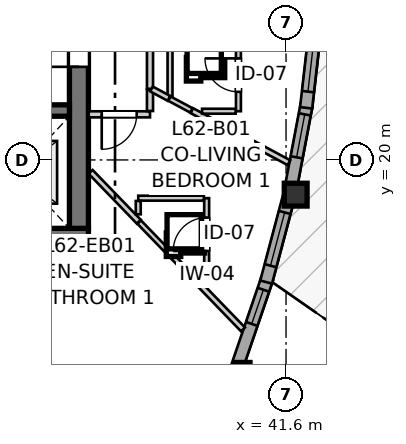
"""IFC4 building model, lengths in metres.
Left out: names, types, materials, properties, quantities, classifications, styles, units other than length and angle.
Written with IfcOpenShell. Run it as: python <this file> out.ifc"""

import sys

from ifc_helpers import new_model, si_unit, direction, frame, frame_2d, origin, origin_2d, place, context, subcontext, project, spatial, rectangle, i_section, extrude, source, transform, mapped, element, fill, save


model = new_model("IFC4")
c1 = context("Model", 3, precision=1e-05, world=origin(), true_north=direction((0.0, 1.0)))
c2 = subcontext(c1, "Body", "Model", "MODEL_VIEW")
j1 = project(units=[si_unit("LENGTHUNIT", "METRE"), si_unit("PLANEANGLEUNIT", "RADIAN")], contexts=[c1])
p1 = place(None, origin())
s1 = spatial("IfcSite", under=j1, at=p1, CompositionType="ELEMENT")
p2 = place(p1, origin())
s2 = spatial("IfcBuilding", under=s1, at=p2, CompositionType="ELEMENT")
p3 = place(p2, frame((0.0, 0.0, 208.4)))
s3 = spatial("IfcBuildingStorey", under=s2, at=p3, CompositionType="ELEMENT", Elevation=208.4)
p4 = place(p3, frame((24.3, 17.95, 0.0), z_axis=(0.0, 0.0, 1.0), x_axis=(1.0, 0.0, 0.0)))
e1 = element("IfcWall", 1, at=p4, inside=s3, PredefinedType="SHEAR", context=c2, shape_type="SweptSolid", body=[
    extrude(rectangle(XDim=12.1, YDim=0.5, at=frame_2d((6.05, 0.0))), origin(), (0.0, 0.0, 1.0), 2.935),
])
p5 = place(p3, frame((36.15, 18.2, 0.0), z_axis=(0.0, 0.0, 1.0), x_axis=(0.0, 1.0, 0.0)))
e2 = element("IfcWall", 2, at=p5, inside=s3, PredefinedType="SHEAR", context=c2, shape_type="SweptSolid", body=[
    extrude(rectangle(XDim=15.6, YDim=0.5, at=frame_2d((7.8, 0.0))), origin(), (0.0, 0.0, 1.0), 2.935),
])
p6 = place(p5, frame((4.25, 0.0, 0.0)))
e3 = element("IfcOpeningElement", 3, at=p6, cuts=e2, PredefinedType="OPENING", context=c2, shape_type="SweptSolid", body=[
    extrude(rectangle(XDim=1.1, YDim=2.15, at=frame_2d((0.55, 1.075))), frame((0.0, 0.26, 0.0), z_axis=(0.0, -1.0, 0.0), x_axis=(1.0, 0.0, 0.0)), (0.0, 0.0, 1.0), 0.52),
])
p7 = place(p5, frame((10.25, 0.0, 0.0)))
e4 = element("IfcOpeningElement", 4, at=p7, cuts=e2, PredefinedType="OPENING", context=c2, shape_type="SweptSolid", body=[
    extrude(rectangle(XDim=1.1, YDim=2.15, at=frame_2d((0.55, 1.075))), frame((0.0, 0.26, 0.0), z_axis=(0.0, -1.0, 0.0), x_axis=(1.0, 0.0, 0.0)), (0.0, 0.0, 1.0), 0.52),
])
p8 = place(p3, frame((24.8, 21.3, 0.0), z_axis=(0.0, 0.0, 1.0), x_axis=(1.0, 0.0, 0.0)))
e5 = element("IfcWall", 5, at=p8, inside=s3, PredefinedType="SHEAR", context=c2, shape_type="SweptSolid", body=[
    extrude(rectangle(XDim=11.1, YDim=0.3, at=frame_2d((5.55, 0.0))), origin(), (0.0, 0.0, 1.0), 2.935),
])
p9 = place(p8, frame((6.22, 0.0, 0.0)))
e6 = element("IfcOpeningElement", 6, at=p9, cuts=e5, PredefinedType="OPENING", context=c2, shape_type="SweptSolid", body=[
    extrude(rectangle(XDim=0.98, YDim=2.15, at=frame_2d((0.49, 1.075))), frame((0.0, 0.16, 0.0), z_axis=(0.0, -1.0, 0.0), x_axis=(1.0, 0.0, 0.0)), (0.0, 0.0, 1.0), 0.32),
])
p10 = place(p8, frame((9.15, 0.0, 0.0)))
e7 = element("IfcOpeningElement", 7, at=p10, cuts=e5, PredefinedType="OPENING", context=c2, shape_type="SweptSolid", body=[
    extrude(rectangle(XDim=1.15, YDim=2.15, at=frame_2d((0.575, 1.075))), frame((0.0, 0.16, 0.0), z_axis=(0.0, -1.0, 0.0), x_axis=(1.0, 0.0, 0.0)), (0.0, 0.0, 1.0), 0.32),
])
m1 = source(origin(), c2, "Body", "SweptSolid", [
    extrude(i_section(OverallWidth=0.398, OverallDepth=0.387, WebThickness=0.019, FlangeThickness=0.03, FilletRadius=0.015, at=origin_2d()), origin(), (0.0, 0.0, 1.0), 2.935),
])
p11 = place(p3, frame((40.452, 14.478, 0.0), z_axis=(0.0, 0.0, 1.0), x_axis=(1.0, 0.0, 0.0)))
e8 = element("IfcColumn", 8, at=p11, inside=s3, PredefinedType="PILASTER", context=c2, shape_type="MappedRepresentation", body=[
    mapped(m1, transform((0.0, 0.0, 0.0), x_axis=(1.0, 0.0, 0.0), y_axis=(0.0, 1.0, 0.0), z_axis=(0.0, 0.0, 1.0), scale=1.0)),
])
m2 = source(origin(), c2, "Body", "SweptSolid", [
    extrude(rectangle(XDim=0.6, YDim=0.6, at=origin_2d()), origin(), (0.0, 0.0, 1.0), 2.935),
])
p12 = place(p3, frame((41.854, 19.086, 0.0), z_axis=(0.0, 0.0, 1.0), x_axis=(1.0, 0.0, 0.0)))
e9 = element("IfcColumn", 9, at=p12, inside=s3, PredefinedType="COLUMN", context=c2, shape_type="MappedRepresentation", body=[
    mapped(m2, transform((0.0, 0.0, 0.0), x_axis=(1.0, 0.0, 0.0), y_axis=(0.0, 1.0, 0.0), z_axis=(0.0, 0.0, 1.0), scale=1.0)),
])
p13 = place(p3, frame((40.308, 14.548, 0.0), z_axis=(0.0, 0.0, 1.0), x_axis=(0.323591564922, 0.946196860654, 0.0)))
e10 = element("IfcWall", 10, at=p13, inside=s3, PredefinedType="SOLIDWALL", context=c2, shape_type="SweptSolid", body=[
    extrude(rectangle(XDim=2.454, YDim=0.32, at=frame_2d((1.227, 0.0))), origin(), (0.0, 0.0, 1.0), 2.555),
])
p14 = place(p13, frame((1.202, 0.0, 0.82)))
e11 = element("IfcOpeningElement", 11, at=p14, cuts=e10, PredefinedType="OPENING", context=c2, shape_type="SweptSolid", body=[
    extrude(rectangle(XDim=0.95, YDim=1.35, at=frame_2d((0.475, 0.675))), frame((0.0, 0.17, 0.0), z_axis=(0.0, -1.0, 0.0), x_axis=(1.0, 0.0, 0.0)), (0.0, 0.0, 1.0), 0.34),
])
p15 = place(p3, frame((41.076, 16.786, 0.0), z_axis=(0.0, 0.0, 1.0), x_axis=(0.257037260973, 0.966401493413, 0.0)))
e12 = element("IfcWall", 12, at=p15, inside=s3, PredefinedType="SOLIDWALL", context=c2, shape_type="SweptSolid", body=[
    extrude(rectangle(XDim=2.333, YDim=0.32, at=frame_2d((1.167, 0.0))), origin(), (0.0, 0.0, 1.0), 2.555),
])
p16 = place(p15, frame((0.446, 0.0, 0.82)))
e13 = element("IfcOpeningElement", 13, at=p16, cuts=e12, PredefinedType="OPENING", context=c2, shape_type="SweptSolid", body=[
    extrude(rectangle(XDim=1.45, YDim=1.25, at=frame_2d((0.725, 0.625))), frame((0.0, 0.17, 0.0), z_axis=(0.0, -1.0, 0.0), x_axis=(1.0, 0.0, 0.0)), (0.0, 0.0, 1.0), 0.34),
])
p17 = place(p3, frame((41.713, 19.205, 0.0), z_axis=(0.0, 0.0, 1.0), x_axis=(0.186691464441, 0.982418595663, 0.0)))
e14 = element("IfcWall", 14, at=p17, inside=s3, PredefinedType="SOLIDWALL", context=c2, shape_type="SweptSolid", body=[
    extrude(rectangle(XDim=2.294, YDim=0.32, at=frame_2d((1.147, 0.0))), origin(), (0.0, 0.0, 1.0), 2.555),
])
p18 = place(p17, frame((0.88, 0.0, 0.82)))
e15 = element("IfcOpeningElement", 15, at=p18, cuts=e14, PredefinedType="OPENING", context=c2, shape_type="SweptSolid", body=[
    extrude(rectangle(XDim=1.15, YDim=1.2, at=frame_2d((0.575, 0.6))), frame((0.0, 0.17, 0.0), z_axis=(0.0, -1.0, 0.0), x_axis=(1.0, 0.0, 0.0)), (0.0, 0.0, 1.0), 0.34),
])
p19 = place(p3, frame((42.128, 21.371, 0.0), z_axis=(0.0, 0.0, 1.0), x_axis=(0.113319777802, 0.993558567956, 0.0)))
e16 = element("IfcWall", 16, at=p19, inside=s3, PredefinedType="SOLIDWALL", context=c2, shape_type="SweptSolid", body=[
    extrude(rectangle(XDim=2.338, YDim=0.32, at=frame_2d((1.169, 0.0))), origin(), (0.0, 0.0, 1.0), 2.555),
])
p20 = place(p19, frame((0.429, 0.0, 0.82)))
e17 = element("IfcOpeningElement", 17, at=p20, cuts=e16, PredefinedType="OPENING", context=c2, shape_type="SweptSolid", body=[
    extrude(rectangle(XDim=1.5, YDim=1.45, at=frame_2d((0.75, 0.725))), frame((0.0, 0.17, 0.0), z_axis=(0.0, -1.0, 0.0), x_axis=(1.0, 0.0, 0.0)), (0.0, 0.0, 1.0), 0.34),
])
p21 = place(p3, frame((38.02, 25.733, 0.0), z_axis=(0.0, 0.0, 1.0), x_axis=(0.0, -1.0, 0.0)))
e18 = element("IfcWall", 18, at=p21, inside=s3, PredefinedType="PARTITIONING", context=c2, shape_type="SweptSolid", body=[
    extrude(rectangle(XDim=3.862, YDim=0.16, at=frame_2d((1.931, 0.0))), origin(), (0.0, 0.0, 1.0), 2.935),
])
p22 = place(p21, frame((1.47, 0.0, 0.0)))
e19 = element("IfcOpeningElement", 19, at=p22, cuts=e18, PredefinedType="OPENING", context=c2, shape_type="SweptSolid", body=[
    extrude(rectangle(XDim=0.92, YDim=2.1, at=frame_2d((0.46, 1.05))), frame((0.0, 0.09, 0.0), z_axis=(0.0, -1.0, 0.0), x_axis=(1.0, 0.0, 0.0)), (0.0, 0.0, 1.0), 0.18),
])
p23 = place(p3, frame((39.511, 17.094, 0.0), z_axis=(0.0, 0.0, 1.0), x_axis=(0.0, 1.0, 0.0)))
e20 = element("IfcWall", 20, at=p23, inside=s3, PredefinedType="PARTITIONING", context=c2, shape_type="SweptSolid", body=[
    extrude(rectangle(XDim=1.9, YDim=0.13, at=frame_2d((0.95, 0.0))), origin(), (0.0, 0.0, 1.0), 2.935),
])
p24 = place(p23, frame((0.51, 0.0, 0.0)))
e21 = element("IfcOpeningElement", 21, at=p24, cuts=e20, PredefinedType="OPENING", context=c2, shape_type="SweptSolid", body=[
    extrude(rectangle(XDim=0.88, YDim=2.05, at=frame_2d((0.44, 1.025))), frame((0.0, 0.075, 0.0), z_axis=(0.0, -1.0, 0.0), x_axis=(1.0, 0.0, 0.0)), (0.0, 0.0, 1.0), 0.15),
])
p25 = place(p3, frame((40.347, 21.282, 0.0), z_axis=(0.0, 0.0, 1.0), x_axis=(0.0, 1.0, 0.0)))
e22 = element("IfcWall", 22, at=p25, inside=s3, PredefinedType="PARTITIONING", context=c2, shape_type="SweptSolid", body=[
    extrude(rectangle(XDim=1.9, YDim=0.13, at=frame_2d((0.95, 0.0))), origin(), (0.0, 0.0, 1.0), 2.573),
])
p26 = place(p25, frame((0.51, 0.0, 0.0)))
e23 = element("IfcOpeningElement", 23, at=p26, cuts=e22, PredefinedType="OPENING", context=c2, shape_type="SweptSolid", body=[
    extrude(rectangle(XDim=0.88, YDim=2.05, at=frame_2d((0.44, 1.025))), frame((0.0, 0.075, 0.0), z_axis=(0.0, -1.0, 0.0), x_axis=(1.0, 0.0, 0.0)), (0.0, 0.0, 1.0), 0.15),
])
p27 = place(p3, frame((38.02, 21.2, 0.0), z_axis=(0.0, 0.0, 1.0), x_axis=(-1.0, 0.0, 0.0)))
e24 = element("IfcWall", 24, at=p27, inside=s3, PredefinedType="PARTITIONING", context=c2, shape_type="SweptSolid", body=[
    extrude(rectangle(XDim=1.612, YDim=0.16, at=frame_2d((0.806, 0.0))), origin(), (0.0, 0.0, 1.0), 2.935),
])
p28 = place(p27, frame((0.35, 0.0, 0.0)))
e25 = element("IfcOpeningElement", 25, at=p28, cuts=e24, PredefinedType="OPENING", context=c2, shape_type="SweptSolid", body=[
    extrude(rectangle(XDim=0.92, YDim=2.1, at=frame_2d((0.46, 1.05))), frame((0.0, 0.09, 0.0), z_axis=(0.0, -1.0, 0.0), x_axis=(1.0, 0.0, 0.0)), (0.0, 0.0, 1.0), 0.18),
])
p29 = place(p3, frame((39.122, 21.297, 0.0), z_axis=(0.0, 0.0, 1.0), x_axis=(0.881308328415, -0.472541670402, 0.0)))
e26 = element("IfcWall", 26, at=p29, inside=s3, PredefinedType="PARTITIONING", context=c2, shape_type="SweptSolid", body=[
    extrude(rectangle(XDim=2.898, YDim=0.145, at=frame_2d((1.449, 0.0))), origin(), (0.0, 0.0, 1.0), 2.935),
])
p30 = place(p3, frame((38.951, 17.109, 0.0), z_axis=(0.0, 0.0, 1.0), x_axis=(0.695195716836, -0.718820502833, 0.0)))
e27 = element("IfcWall", 27, at=p30, inside=s3, PredefinedType="PARTITIONING", context=c2, shape_type="SweptSolid", body=[
    extrude(rectangle(XDim=2.18, YDim=0.145, at=frame_2d((1.09, 0.0))), origin(), (0.0, 0.0, 1.0), 2.935),
])
p31 = place(p3, frame((36.458, 19.686, 0.0), z_axis=(0.0, 0.0, 1.0), x_axis=(0.695231916786, -0.718785490868, 0.0)))
e28 = element("IfcWall", 28, at=p31, inside=s3, PredefinedType="PARTITIONING", context=c2, shape_type="SweptSolid", body=[
    extrude(rectangle(XDim=1.824, YDim=0.145, at=frame_2d((0.912, 0.0))), origin(), (0.0, 0.0, 1.0), 2.935),
])
p32 = place(p3, frame((37.711, 18.994, 0.0), z_axis=(0.0, 0.0, 1.0), x_axis=(1.0, 0.0, 0.0)))
e29 = element("IfcWall", 29, at=p32, inside=s3, PredefinedType="PARTITIONING", context=c2, shape_type="SweptSolid", body=[
    extrude(rectangle(XDim=1.727, YDim=0.13, at=frame_2d((0.864, 0.0))), origin(), (0.0, 0.0, 1.0), 2.935),
])
p33 = place(p3, frame((37.736, 18.364, 0.0), z_axis=(0.0, 0.0, 1.0), x_axis=(0.695451956037, -0.718572596781, 0.0)))
e30 = element("IfcWall", 30, at=p33, inside=s3, PredefinedType="PARTITIONING", context=c2, shape_type="SweptSolid", body=[
    extrude(rectangle(XDim=1.732, YDim=0.13, at=frame_2d((0.866, 0.0))), origin(), (0.0, 0.0, 1.0), 2.935),
])
p34 = place(p3, frame((38.547, 21.605, 0.0), z_axis=(0.0, 0.0, 1.0), x_axis=(0.0, 1.0, 0.0)))
e31 = element("IfcWall", 31, at=p34, inside=s3, PredefinedType="PARTITIONING", context=c2, shape_type="SweptSolid", body=[
    extrude(rectangle(XDim=1.504, YDim=0.13, at=frame_2d((0.752, 0.0))), origin(), (0.0, 0.0, 1.0), 2.603),
])
p35 = place(p3, frame((39.39, 21.282, 0.0), z_axis=(0.0, 0.0, 1.0), x_axis=(1.0, 0.0, 0.0)))
e32 = element("IfcWall", 32, at=p35, inside=s3, PredefinedType="PARTITIONING", context=c2, shape_type="SweptSolid", body=[
    extrude(rectangle(XDim=0.884, YDim=0.13, at=frame_2d((0.442, 0.0))), origin(), (0.0, 0.0, 1.0), 2.935),
])
p36 = place(p3, frame((38.02, 21.288, 0.0), z_axis=(0.0, 0.0, 1.0), x_axis=(0.0, 1.0, 0.0)))
e33 = element("IfcWall", 33, at=p36, inside=s3, PredefinedType="PARTITIONING", context=c2, shape_type="SweptSolid", body=[
    extrude(rectangle(XDim=0.568, YDim=0.16, at=frame_2d((0.284, 0.0))), origin(), (0.0, 0.0, 1.0), 2.935),
])
p37 = place(p3, frame((38.532, 21.613, 0.0), z_axis=(0.0, 0.0, 1.0), x_axis=(0.881618593919, -0.471962556626, 0.0)))
e34 = element("IfcWall", 34, at=p37, inside=s3, PredefinedType="PARTITIONING", context=c2, shape_type="SweptSolid", body=[
    extrude(rectangle(XDim=0.654, YDim=0.13, at=frame_2d((0.327, 0.0))), origin(), (0.0, 0.0, 1.0), 2.935),
])
p38 = place(p3, frame((37.711, 18.571, 0.0), z_axis=(0.0, 0.0, 1.0), x_axis=(0.0, 1.0, 0.0)))
e35 = element("IfcWall", 35, at=p38, inside=s3, PredefinedType="PARTITIONING", context=c2, shape_type="SweptSolid", body=[
    extrude(rectangle(XDim=0.35, YDim=0.13, at=frame_2d((0.175, 0.0))), origin(), (0.0, 0.0, 1.0), 2.935),
])
p39 = place(p3, frame((38.06, 21.867, 0.0), z_axis=(0.0, 0.0, 1.0), x_axis=(0.881026965879, -0.473066047601, 0.0)))
e36 = element("IfcWall", 36, at=p39, inside=s3, PredefinedType="PARTITIONING", context=c2, shape_type="SweptSolid", body=[
    extrude(rectangle(XDim=0.521, YDim=0.145, at=frame_2d((0.261, 0.0))), origin(), (0.0, 0.0, 1.0), 2.935),
])
p40 = place(p3, frame((39.056, 17.094, 0.0), z_axis=(0.0, 0.0, 1.0), x_axis=(1.0, 0.0, 0.0)))
e37 = element("IfcWall", 37, at=p40, inside=s3, PredefinedType="PARTITIONING", context=c2, shape_type="SweptSolid", body=[
    extrude(rectangle(XDim=0.455, YDim=0.13, at=frame_2d((0.228, 0.0))), origin(), (0.0, 0.0, 1.0), 2.935),
])
m3 = source(origin(), c2, "Body", "SweptSolid", [
    extrude(rectangle(XDim=0.95, YDim=1.35, at=frame_2d((0.475, 0.675))), frame((0.0, 0.03, 0.0), z_axis=(0.0, -1.0, 0.0), x_axis=(1.0, 0.0, 0.0)), (0.0, 0.0, 1.0), 0.06),
])
p41 = place(p14, origin())
e38 = element("IfcWindow", 38, at=p41, inside=s3, PartitioningType="SINGLE_PANEL", PredefinedType="WINDOW", context=c2, shape_type="MappedRepresentation", body=[
    mapped(m3, transform((0.0, 0.0, 0.0), x_axis=(1.0, 0.0, 0.0), y_axis=(0.0, 1.0, 0.0), z_axis=(0.0, 0.0, 1.0), scale=1.0)),
])
fill(e11, e38)
m4 = source(origin(), c2, "Body", "SweptSolid", [
    extrude(rectangle(XDim=1.45, YDim=1.25, at=frame_2d((0.725, 0.625))), frame((0.0, 0.03, 0.0), z_axis=(0.0, -1.0, 0.0), x_axis=(1.0, 0.0, 0.0)), (0.0, 0.0, 1.0), 0.06),
])
p42 = place(p16, origin())
e39 = element("IfcWindow", 39, at=p42, inside=s3, PartitioningType="SINGLE_PANEL", PredefinedType="WINDOW", context=c2, shape_type="MappedRepresentation", body=[
    mapped(m4, transform((0.0, 0.0, 0.0), x_axis=(1.0, 0.0, 0.0), y_axis=(0.0, 1.0, 0.0), z_axis=(0.0, 0.0, 1.0), scale=1.0)),
])
fill(e13, e39)
m5 = source(origin(), c2, "Body", "SweptSolid", [
    extrude(rectangle(XDim=1.15, YDim=1.2, at=frame_2d((0.575, 0.6))), frame((0.0, 0.03, 0.0), z_axis=(0.0, -1.0, 0.0), x_axis=(1.0, 0.0, 0.0)), (0.0, 0.0, 1.0), 0.06),
])
p43 = place(p18, origin())
e40 = element("IfcWindow", 40, at=p43, inside=s3, PartitioningType="SINGLE_PANEL", PredefinedType="WINDOW", context=c2, shape_type="MappedRepresentation", body=[
    mapped(m5, transform((0.0, 0.0, 0.0), x_axis=(1.0, 0.0, 0.0), y_axis=(0.0, 1.0, 0.0), z_axis=(0.0, 0.0, 1.0), scale=1.0)),
])
fill(e15, e40)
m6 = source(origin(), c2, "Body", "SweptSolid", [
    extrude(rectangle(XDim=1.5, YDim=1.45, at=frame_2d((0.75, 0.725))), frame((0.0, 0.03, 0.0), z_axis=(0.0, -1.0, 0.0), x_axis=(1.0, 0.0, 0.0)), (0.0, 0.0, 1.0), 0.06),
])
p44 = place(p20, origin())
e41 = element("IfcWindow", 41, at=p44, inside=s3, PartitioningType="SINGLE_PANEL", PredefinedType="WINDOW", context=c2, shape_type="MappedRepresentation", body=[
    mapped(m6, transform((0.0, 0.0, 0.0), x_axis=(1.0, 0.0, 0.0), y_axis=(0.0, 1.0, 0.0), z_axis=(0.0, 0.0, 1.0), scale=1.0)),
])
fill(e17, e41)
m7 = source(origin(), c2, "Body", "SweptSolid", [
    extrude(rectangle(XDim=1.1, YDim=2.15, at=frame_2d((0.55, 1.075))), frame((0.0, 0.025, 0.0), z_axis=(0.0, -1.0, 0.0), x_axis=(1.0, 0.0, 0.0)), (0.0, 0.0, 1.0), 0.05),
])
p45 = place(p6, origin())
e42 = element("IfcDoor", 42, at=p45, inside=s3, OperationType="SINGLE_SWING_LEFT", PredefinedType="DOOR", context=c2, shape_type="MappedRepresentation", body=[
    mapped(m7, transform((0.0, 0.0, 0.0), x_axis=(1.0, 0.0, 0.0), y_axis=(0.0, 1.0, 0.0), z_axis=(0.0, 0.0, 1.0), scale=1.0)),
])
fill(e3, e42)
m8 = source(origin(), c2, "Body", "SweptSolid", [
    extrude(rectangle(XDim=0.88, YDim=2.05, at=frame_2d((0.44, 1.025))), frame((0.0, 0.025, 0.0), z_axis=(0.0, -1.0, 0.0), x_axis=(1.0, 0.0, 0.0)), (0.0, 0.0, 1.0), 0.05),
])
p46 = place(p24, origin())
e43 = element("IfcDoor", 43, at=p46, inside=s3, OperationType="SINGLE_SWING_LEFT", PredefinedType="DOOR", context=c2, shape_type="MappedRepresentation", body=[
    mapped(m8, transform((0.0, 0.0, 0.0), x_axis=(1.0, 0.0, 0.0), y_axis=(0.0, 1.0, 0.0), z_axis=(0.0, 0.0, 1.0), scale=1.0)),
])
fill(e21, e43)
p47 = place(p26, origin())
e44 = element("IfcDoor", 44, at=p47, inside=s3, OperationType="SINGLE_SWING_RIGHT", PredefinedType="DOOR", context=c2, shape_type="MappedRepresentation", body=[
    mapped(m8, transform((0.0, 0.0, 0.0), x_axis=(1.0, 0.0, 0.0), y_axis=(0.0, 1.0, 0.0), z_axis=(0.0, 0.0, 1.0), scale=1.0)),
])
fill(e23, e44)
m9 = source(origin(), c2, "Body", "SweptSolid", [
    extrude(rectangle(XDim=0.92, YDim=2.1, at=frame_2d((0.46, 1.05))), frame((0.0, 0.025, 0.0), z_axis=(0.0, -1.0, 0.0), x_axis=(1.0, 0.0, 0.0)), (0.0, 0.0, 1.0), 0.05),
])
p48 = place(p28, origin())
e45 = element("IfcDoor", 45, at=p48, inside=s3, OperationType="SINGLE_SWING_RIGHT", PredefinedType="DOOR", context=c2, shape_type="MappedRepresentation", body=[
    mapped(m9, transform((0.0, 0.0, 0.0), x_axis=(1.0, 0.0, 0.0), y_axis=(0.0, 1.0, 0.0), z_axis=(0.0, 0.0, 1.0), scale=1.0)),
])
fill(e25, e45)
save(model, sys.argv[1])
